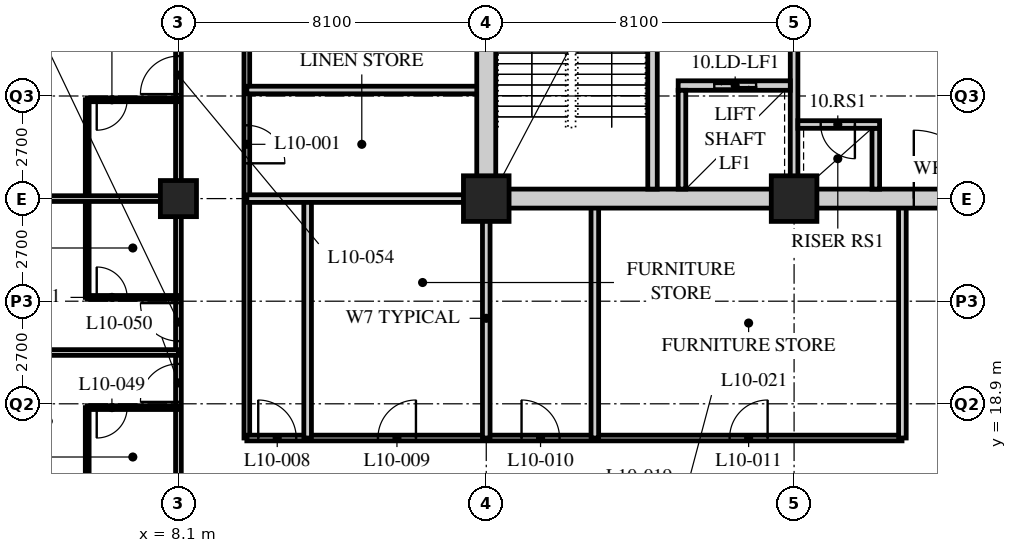
"""IFC4 building model, lengths in metres.
Left out: names, types, materials, properties, quantities, classifications, styles, units other than length and angle.
Written with IfcOpenShell. Run it as: python <this file> out.ifc"""

import sys

from ifc_helpers import new_model, si_unit, direction, frame, frame_2d, origin, origin_2d, place, context, subcontext, project, spatial, rectangle, hollow_rectangle, extrude, element, fill, save


model = new_model("IFC4")
c1 = context("Model", 3, precision=1e-05, world=origin(), true_north=direction((0.0, 1.0)))
c2 = subcontext(c1, "Body", "Model", "MODEL_VIEW")
j1 = project(units=[si_unit("LENGTHUNIT", "METRE"), si_unit("PLANEANGLEUNIT", "RADIAN")], contexts=[c1])
p1 = place(None, origin())
s1 = spatial("IfcSite", under=j1, at=p1, CompositionType="ELEMENT")
p2 = place(p1, origin())
s2 = spatial("IfcBuilding", under=s1, at=p2, CompositionType="ELEMENT")
p3 = place(p2, frame((0.0, 0.0, 46.6)))
s3 = spatial("IfcBuildingStorey", under=s2, at=p3, CompositionType="ELEMENT", Elevation=46.6)
p4 = place(p3, frame((8.1, 24.3, 0.0), z_axis=(0.0, 0.0, 1.0), x_axis=(1.0, 0.0, 0.0)))
e1 = element("IfcColumn", 1, at=p4, inside=s3, PredefinedType="COLUMN", context=c2, shape_type="SweptSolid", body=[
    extrude(hollow_rectangle(XDim=0.95, YDim=0.95, WallThickness=0.095, at=origin_2d()), origin(), (0.0, 0.0, 1.0), 3.4),
])
for number, where, z_axis, x_axis in (
    (2, (16.2, 24.3, 0.0), (0.0, 0.0, 1.0), (1.0, 0.0, 0.0)),
    (3, (24.3, 24.3, 0.0), (0.0, 0.0, 1.0), (1.0, 0.0, 0.0)),
):
    element("IfcColumn", number, at=place(p3, frame(where, z_axis=z_axis, x_axis=x_axis)), inside=s3, PredefinedType="COLUMN", context=c2, shape_type="SweptSolid", body=[
        extrude(hollow_rectangle(XDim=1.2, YDim=1.2, WallThickness=0.12, at=origin_2d()), origin(), (0.0, 0.0, 1.0), 3.4),
    ])
p5 = place(p3, frame((8.1, 16.2, 0.0), z_axis=(0.0, 0.0, 1.0), x_axis=(0.0, 1.0, 0.0)))
e4 = element("IfcWall", 4, at=p5, inside=s3, PredefinedType="PARTITIONING", context=c2, shape_type="SweptSolid", body=[
    extrude(rectangle(XDim=26.1, YDim=0.15, at=frame_2d((13.05, 0.0))), origin(), (0.0, 0.0, 1.0), 2.578),
])
p6 = place(p5, frame((2.75, 0.0, 0.0)))
e5 = element("IfcOpeningElement", 5, at=p6, cuts=e4, PredefinedType="OPENING", context=c2, shape_type="SweptSolid", body=[
    extrude(rectangle(XDim=1.0, YDim=2.1, at=frame_2d((0.5, 1.05))), frame((0.0, 0.085, 0.0), z_axis=(0.0, -1.0, 0.0), x_axis=(1.0, 0.0, 0.0)), (0.0, 0.0, 1.0), 0.17),
])
p7 = place(p5, frame((4.35, 0.0, 0.0)))
e6 = element("IfcOpeningElement", 6, at=p7, cuts=e4, PredefinedType="OPENING", context=c2, shape_type="SweptSolid", body=[
    extrude(rectangle(XDim=1.0, YDim=2.1, at=frame_2d((0.5, 1.05))), frame((0.0, 0.085, 0.0), z_axis=(0.0, -1.0, 0.0), x_axis=(1.0, 0.0, 0.0)), (0.0, 0.0, 1.0), 0.17),
])
p8 = place(p5, frame((10.85, 0.0, 0.0)))
e7 = element("IfcOpeningElement", 7, at=p8, cuts=e4, PredefinedType="OPENING", context=c2, shape_type="SweptSolid", body=[
    extrude(rectangle(XDim=1.0, YDim=2.1, at=frame_2d((0.5, 1.05))), frame((0.0, 0.085, 0.0), z_axis=(0.0, -1.0, 0.0), x_axis=(1.0, 0.0, 0.0)), (0.0, 0.0, 1.0), 0.17),
])
p9 = place(p5, frame((12.45, 0.0, 0.0)))
e8 = element("IfcOpeningElement", 8, at=p9, cuts=e4, PredefinedType="OPENING", context=c2, shape_type="SweptSolid", body=[
    extrude(rectangle(XDim=1.0, YDim=2.1, at=frame_2d((0.5, 1.05))), frame((0.0, 0.085, 0.0), z_axis=(0.0, -1.0, 0.0), x_axis=(1.0, 0.0, 0.0)), (0.0, 0.0, 1.0), 0.17),
])
p10 = place(p5, frame((18.65, 0.0, 0.0)))
e9 = element("IfcOpeningElement", 9, at=p10, cuts=e4, PredefinedType="OPENING", context=c2, shape_type="SweptSolid", body=[
    extrude(rectangle(XDim=1.0, YDim=2.1, at=frame_2d((0.5, 1.05))), frame((0.0, 0.085, 0.0), z_axis=(0.0, -1.0, 0.0), x_axis=(1.0, 0.0, 0.0)), (0.0, 0.0, 1.0), 0.17),
])
p11 = place(p5, frame((22.7, 0.0, 0.0)))
e10 = element("IfcOpeningElement", 10, at=p11, cuts=e4, PredefinedType="OPENING", context=c2, shape_type="SweptSolid", body=[
    extrude(rectangle(XDim=1.0, YDim=2.1, at=frame_2d((0.5, 1.05))), frame((0.0, 0.085, 0.0), z_axis=(0.0, -1.0, 0.0), x_axis=(1.0, 0.0, 0.0)), (0.0, 0.0, 1.0), 0.17),
])
p12 = place(p3, frame((9.9, 40.5, 0.0), z_axis=(0.0, 0.0, 1.0), x_axis=(0.0, -1.0, 0.0)))
e11 = element("IfcWall", 11, at=p12, inside=s3, PredefinedType="PARTITIONING", context=c2, shape_type="SweptSolid", body=[
    extrude(rectangle(XDim=22.5, YDim=0.15, at=frame_2d((11.25, 0.0))), origin(), (0.0, 0.0, 1.0), 3.19),
])
p13 = place(p12, frame((14.271, 0.0, 0.0)))
e12 = element("IfcOpeningElement", 12, at=p13, cuts=e11, PredefinedType="OPENING", context=c2, shape_type="SweptSolid", body=[
    extrude(rectangle(XDim=1.0, YDim=2.1, at=frame_2d((0.5, 1.05))), frame((0.0, 0.085, 0.0), z_axis=(0.0, -1.0, 0.0), x_axis=(1.0, 0.0, 0.0)), (0.0, 0.0, 1.0), 0.17),
])
p14 = place(p12, frame((10.221, 0.0, 0.0)))
e13 = element("IfcOpeningElement", 13, at=p14, cuts=e11, PredefinedType="OPENING", context=c2, shape_type="SweptSolid", body=[
    extrude(rectangle(XDim=1.0, YDim=2.1, at=frame_2d((0.5, 1.05))), frame((0.0, 0.085, 0.0), z_axis=(0.0, -1.0, 0.0), x_axis=(1.0, 0.0, 0.0)), (0.0, 0.0, 1.0), 0.17),
])
p15 = place(p12, frame((6.8, 0.0, 0.0)))
e14 = element("IfcOpeningElement", 14, at=p15, cuts=e11, PredefinedType="OPENING", context=c2, shape_type="SweptSolid", body=[
    extrude(rectangle(XDim=1.0, YDim=2.1, at=frame_2d((0.5, 1.05))), frame((0.0, 0.085, 0.0), z_axis=(0.0, -1.0, 0.0), x_axis=(1.0, 0.0, 0.0)), (0.0, 0.0, 1.0), 0.17),
])
p16 = place(p12, frame((2.75, 0.0, 0.0)))
e15 = element("IfcOpeningElement", 15, at=p16, cuts=e11, PredefinedType="OPENING", context=c2, shape_type="SweptSolid", body=[
    extrude(rectangle(XDim=1.0, YDim=2.1, at=frame_2d((0.5, 1.05))), frame((0.0, 0.085, 0.0), z_axis=(0.0, -1.0, 0.0), x_axis=(1.0, 0.0, 0.0)), (0.0, 0.0, 1.0), 0.17),
])
p17 = place(p3, frame((9.9, 18.0, 0.0), z_axis=(0.0, 0.0, 1.0), x_axis=(1.0, 0.0, 0.0)))
e16 = element("IfcWall", 16, at=p17, inside=s3, PredefinedType="PARTITIONING", context=c2, shape_type="SweptSolid", body=[
    extrude(rectangle(XDim=17.24, YDim=0.15, at=frame_2d((8.62, 0.0))), origin(), (0.0, 0.0, 1.0), 3.19),
])
p18 = place(p17, frame((0.3, 0.0, 0.0)))
e17 = element("IfcOpeningElement", 17, at=p18, cuts=e16, PredefinedType="OPENING", context=c2, shape_type="SweptSolid", body=[
    extrude(rectangle(XDim=1.0, YDim=2.1, at=frame_2d((0.5, 1.05))), frame((0.0, 0.085, 0.0), z_axis=(0.0, -1.0, 0.0), x_axis=(1.0, 0.0, 0.0)), (0.0, 0.0, 1.0), 0.17),
])
p19 = place(p17, frame((3.45, 0.0, 0.0)))
e18 = element("IfcOpeningElement", 18, at=p19, cuts=e16, PredefinedType="OPENING", context=c2, shape_type="SweptSolid", body=[
    extrude(rectangle(XDim=1.0, YDim=2.1, at=frame_2d((0.5, 1.05))), frame((0.0, 0.085, 0.0), z_axis=(0.0, -1.0, 0.0), x_axis=(1.0, 0.0, 0.0)), (0.0, 0.0, 1.0), 0.17),
])
p20 = place(p17, frame((7.229, 0.0, 0.0)))
e19 = element("IfcOpeningElement", 19, at=p20, cuts=e16, PredefinedType="OPENING", context=c2, shape_type="SweptSolid", body=[
    extrude(rectangle(XDim=1.0, YDim=2.1, at=frame_2d((0.5, 1.05))), frame((0.0, 0.085, 0.0), z_axis=(0.0, -1.0, 0.0), x_axis=(1.0, 0.0, 0.0)), (0.0, 0.0, 1.0), 0.17),
])
p21 = place(p17, frame((12.704, 0.0, 0.0)))
e20 = element("IfcOpeningElement", 20, at=p21, cuts=e16, PredefinedType="OPENING", context=c2, shape_type="SweptSolid", body=[
    extrude(rectangle(XDim=1.0, YDim=2.1, at=frame_2d((0.5, 1.05))), frame((0.0, 0.085, 0.0), z_axis=(0.0, -1.0, 0.0), x_axis=(1.0, 0.0, 0.0)), (0.0, 0.0, 1.0), 0.17),
])
p22 = place(p3, frame((9.9, 27.157, 0.0), z_axis=(0.0, 0.0, 1.0), x_axis=(1.0, 0.0, 0.0)))
e21 = element("IfcWall", 21, at=p22, inside=s3, PredefinedType="SOLIDWALL", context=c2, shape_type="SweptSolid", body=[
    extrude(rectangle(XDim=6.3, YDim=0.2, at=frame_2d((3.15, 0.0))), origin(), (0.0, 0.0, 1.0), 3.19),
])
p23 = place(p3, frame((16.2, 18.0, 0.0), z_axis=(0.0, 0.0, 1.0), x_axis=(0.0, 1.0, 0.0)))
e22 = element("IfcWall", 22, at=p23, inside=s3, PredefinedType="SOLIDWALL", context=c2, shape_type="SweptSolid", body=[
    extrude(rectangle(XDim=6.3, YDim=0.2, at=frame_2d((3.15, 0.0))), origin(), (0.0, 0.0, 1.0), 2.578),
])
for number, where, z_axis, x_axis in (
    (23, (11.5, 18.0, 0.0), (0.0, 0.0, 1.0), (0.0, 1.0, 0.0)),
    (24, (19.057, 18.0, 0.0), (0.0, 0.0, 1.0), (0.0, 1.0, 0.0)),
    (25, (27.15, 18.0, 0.0), (0.0, 0.0, 1.0), (0.0, 1.0, 0.0)),
):
    element("IfcWall", number, at=place(p3, frame(where, z_axis=z_axis, x_axis=x_axis)), inside=s3, PredefinedType="SOLIDWALL", context=c2, shape_type="SweptSolid", body=[
        extrude(rectangle(XDim=6.3, YDim=0.2, at=frame_2d((3.15, 0.0))), origin(), (0.0, 0.0, 1.0), 3.19),
    ])
p24 = place(p3, frame((9.9, 24.3, 0.0), z_axis=(0.0, 0.0, 1.0), x_axis=(1.0, 0.0, 0.0)))
e26 = element("IfcWall", 26, at=p24, inside=s3, PredefinedType="SOLIDWALL", context=c2, shape_type="SweptSolid", body=[
    extrude(rectangle(XDim=6.3, YDim=0.2, at=frame_2d((3.15, 0.0))), origin(), (0.0, 0.0, 1.0), 2.578),
])
p25 = place(p3, frame((5.7, 16.2, 0.0), z_axis=(0.0, 0.0, 1.0), x_axis=(0.0, 1.0, 0.0)))
e27 = element("IfcWall", 27, at=p25, inside=s3, PredefinedType="PARTITIONING", context=c2, shape_type="SweptSolid", body=[
    extrude(rectangle(XDim=2.6, YDim=0.1, at=frame_2d((1.3, 0.0))), origin(), (0.0, 0.0, 1.0), 3.19),
])
p26 = place(p3, frame((8.1, 18.8, 0.0), z_axis=(0.0, 0.0, 1.0), x_axis=(-1.0, 0.0, 0.0)))
e28 = element("IfcWall", 28, at=p26, inside=s3, PredefinedType="PARTITIONING", context=c2, shape_type="SweptSolid", body=[
    extrude(rectangle(XDim=2.4, YDim=0.1, at=frame_2d((1.2, 0.0))), origin(), (0.0, 0.0, 1.0), 3.19),
])
p27 = place(p26, frame((1.35, 0.0, 0.0)))
e29 = element("IfcOpeningElement", 29, at=p27, cuts=e28, PredefinedType="OPENING", context=c2, shape_type="SweptSolid", body=[
    extrude(rectangle(XDim=0.8, YDim=2.1, at=frame_2d((0.4, 1.05))), frame((0.0, 0.06, 0.0), z_axis=(0.0, -1.0, 0.0), x_axis=(1.0, 0.0, 0.0)), (0.0, 0.0, 1.0), 0.12),
])
p28 = place(p3, frame((8.1, 20.25, 0.0), z_axis=(0.0, 0.0, 1.0), x_axis=(-1.0, 0.0, 0.0)))
e30 = element("IfcWall", 30, at=p28, inside=s3, PredefinedType="PARTITIONING", context=c2, shape_type="SweptSolid", body=[
    extrude(rectangle(XDim=7.8, YDim=0.15, at=frame_2d((3.9, 0.0))), origin(), (0.0, 0.0, 1.0), 3.19),
])
p29 = place(p3, frame((5.7, 21.7, 0.0), z_axis=(0.0, 0.0, 1.0), x_axis=(0.0, 1.0, 0.0)))
e31 = element("IfcWall", 31, at=p29, inside=s3, PredefinedType="PARTITIONING", context=c2, shape_type="SweptSolid", body=[
    extrude(rectangle(XDim=5.2, YDim=0.1, at=frame_2d((2.6, 0.0))), origin(), (0.0, 0.0, 1.0), 3.19),
])
p30 = place(p3, frame((8.1, 21.7, 0.0), z_axis=(0.0, 0.0, 1.0), x_axis=(-1.0, 0.0, 0.0)))
e32 = element("IfcWall", 32, at=p30, inside=s3, PredefinedType="PARTITIONING", context=c2, shape_type="SweptSolid", body=[
    extrude(rectangle(XDim=2.4, YDim=0.1, at=frame_2d((1.2, 0.0))), origin(), (0.0, 0.0, 1.0), 3.19),
])
p31 = place(p30, frame((1.35, 0.0, 0.0)))
e33 = element("IfcOpeningElement", 33, at=p31, cuts=e32, PredefinedType="OPENING", context=c2, shape_type="SweptSolid", body=[
    extrude(rectangle(XDim=0.8, YDim=2.1, at=frame_2d((0.4, 1.05))), frame((0.0, 0.06, 0.0), z_axis=(0.0, -1.0, 0.0), x_axis=(1.0, 0.0, 0.0)), (0.0, 0.0, 1.0), 0.12),
])
p32 = place(p3, frame((8.1, 24.3, 0.0), z_axis=(0.0, 0.0, 1.0), x_axis=(-1.0, 0.0, 0.0)))
e34 = element("IfcWall", 34, at=p32, inside=s3, PredefinedType="PARTITIONING", context=c2, shape_type="SweptSolid", body=[
    extrude(rectangle(XDim=7.8, YDim=0.15, at=frame_2d((3.9, 0.0))), origin(), (0.0, 0.0, 1.0), 2.578),
])
p33 = place(p3, frame((8.1, 26.9, 0.0), z_axis=(0.0, 0.0, 1.0), x_axis=(-1.0, 0.0, 0.0)))
e35 = element("IfcWall", 35, at=p33, inside=s3, PredefinedType="PARTITIONING", context=c2, shape_type="SweptSolid", body=[
    extrude(rectangle(XDim=2.4, YDim=0.1, at=frame_2d((1.2, 0.0))), origin(), (0.0, 0.0, 1.0), 3.19),
])
p34 = place(p33, frame((1.35, 0.0, 0.0)))
e36 = element("IfcOpeningElement", 36, at=p34, cuts=e35, PredefinedType="OPENING", context=c2, shape_type="SweptSolid", body=[
    extrude(rectangle(XDim=0.8, YDim=2.1, at=frame_2d((0.4, 1.05))), frame((0.0, 0.06, 0.0), z_axis=(0.0, -1.0, 0.0), x_axis=(1.0, 0.0, 0.0)), (0.0, 0.0, 1.0), 0.12),
])
p35 = place(p3, frame((15.95, 24.3, 0.0), z_axis=(0.0, 0.0, 1.0), x_axis=(1.0, 0.0, 0.0)))
e37 = element("IfcWall", 37, at=p35, inside=s3, PredefinedType="SOLIDWALL", context=c2, shape_type="SweptSolid", body=[
    extrude(rectangle(XDim=24.8, YDim=0.5, at=frame_2d((12.4, 0.0))), origin(), (0.0, 0.0, 1.0), 2.54),
])
p36 = place(p35, frame((11.5, 0.0, 0.0)))
e38 = element("IfcOpeningElement", 38, at=p36, cuts=e37, PredefinedType="OPENING", context=c2, shape_type="SweptSolid", body=[
    extrude(rectangle(XDim=1.8, YDim=2.4, at=frame_2d((0.9, 1.2))), frame((0.0, 0.26, 0.0), z_axis=(0.0, -1.0, 0.0), x_axis=(1.0, 0.0, 0.0)), (0.0, 0.0, 1.0), 0.52),
])
p37 = place(p3, frame((16.2, 24.55, 0.0), z_axis=(0.0, 0.0, 1.0), x_axis=(0.0, 1.0, 0.0)))
e39 = element("IfcWall", 39, at=p37, inside=s3, PredefinedType="SOLIDWALL", context=c2, shape_type="SweptSolid", body=[
    extrude(rectangle(XDim=15.7, YDim=0.5, at=frame_2d((7.85, 0.0))), origin(), (0.0, 0.0, 1.0), 2.578),
])
p38 = place(p3, frame((24.3, 24.55, 0.0), z_axis=(0.0, 0.0, 1.0), x_axis=(0.0, 1.0, 0.0)))
e40 = element("IfcWall", 40, at=p38, inside=s3, PredefinedType="SOLIDWALL", context=c2, shape_type="SweptSolid", body=[
    extrude(rectangle(XDim=7.75, YDim=0.2, at=frame_2d((3.875, 0.0))), origin(), (0.0, 0.0, 1.0), 2.578),
])
p39 = place(p38, frame((4.6, 0.0, 0.0)))
e41 = element("IfcOpeningElement", 41, at=p39, cuts=e40, PredefinedType="OPENING", context=c2, shape_type="SweptSolid", body=[
    extrude(rectangle(XDim=1.2, YDim=2.1, at=frame_2d((0.6, 1.05))), frame((0.0, 0.11, 0.0), z_axis=(0.0, -1.0, 0.0), x_axis=(1.0, 0.0, 0.0)), (0.0, 0.0, 1.0), 0.22),
])
p40 = place(p3, frame((20.575, 24.55, 0.0), z_axis=(0.0, 0.0, 1.0), x_axis=(0.0, 1.0, 0.0)))
e42 = element("IfcWall", 42, at=p40, inside=s3, PredefinedType="SOLIDWALL", context=c2, shape_type="SweptSolid", body=[
    extrude(rectangle(XDim=7.75, YDim=0.25, at=frame_2d((3.875, 0.0))), origin(), (0.0, 0.0, 1.0), 3.19),
])
p41 = place(p40, frame((6.2, 0.0, 0.0)))
e43 = element("IfcOpeningElement", 43, at=p41, cuts=e42, PredefinedType="OPENING", context=c2, shape_type="SweptSolid", body=[
    extrude(rectangle(XDim=1.2, YDim=2.1, at=frame_2d((0.6, 1.05))), frame((0.0, 0.135, 0.0), z_axis=(0.0, -1.0, 0.0), x_axis=(1.0, 0.0, 0.0)), (0.0, 0.0, 1.0), 0.27),
])
p42 = place(p3, frame((21.25, 27.275, 0.0), z_axis=(0.0, 0.0, 1.0), x_axis=(1.0, 0.0, 0.0)))
e44 = element("IfcWall", 44, at=p42, inside=s3, PredefinedType="SOLIDWALL", context=c2, shape_type="SweptSolid", body=[
    extrude(rectangle(XDim=2.95, YDim=0.25, at=frame_2d((1.475, 0.0))), origin(), (0.0, 0.0, 1.0), 3.19),
])
p43 = place(p42, frame((0.95, 0.0, 0.0)))
e45 = element("IfcOpeningElement", 45, at=p43, cuts=e44, PredefinedType="OPENING", context=c2, shape_type="SweptSolid", body=[
    extrude(rectangle(XDim=1.1, YDim=2.4, at=frame_2d((0.55, 1.2))), frame((0.0, 0.135, 0.0), z_axis=(0.0, -1.0, 0.0), x_axis=(1.0, 0.0, 0.0)), (0.0, 0.0, 1.0), 0.27),
])
p44 = place(p3, frame((21.35, 24.55, 0.0), z_axis=(0.0, 0.0, 1.0), x_axis=(0.0, 1.0, 0.0)))
e46 = element("IfcWall", 46, at=p44, inside=s3, PredefinedType="SOLIDWALL", context=c2, shape_type="SweptSolid", body=[
    extrude(rectangle(XDim=2.6, YDim=0.2, at=frame_2d((1.3, 0.0))), origin(), (0.0, 0.0, 1.0), 3.19),
])
p45 = place(p3, frame((26.45, 24.55, 0.0), z_axis=(0.0, 0.0, 1.0), x_axis=(0.0, 1.0, 0.0)))
e47 = element("IfcWall", 47, at=p45, inside=s3, PredefinedType="SOLIDWALL", context=c2, shape_type="SweptSolid", body=[
    extrude(rectangle(XDim=1.6, YDim=0.2, at=frame_2d((0.8, 0.0))), origin(), (0.0, 0.0, 1.0), 3.19),
])
p46 = place(p3, frame((24.4, 26.25, 0.0), z_axis=(0.0, 0.0, 1.0), x_axis=(1.0, 0.0, 0.0)))
e48 = element("IfcWall", 48, at=p46, inside=s3, PredefinedType="SOLIDWALL", context=c2, shape_type="SweptSolid", body=[
    extrude(rectangle(XDim=2.15, YDim=0.2, at=frame_2d((1.075, 0.0))), origin(), (0.0, 0.0, 1.0), 3.19),
])
p47 = place(p46, frame((0.6, 0.0, 0.0)))
e49 = element("IfcOpeningElement", 49, at=p47, cuts=e48, PredefinedType="OPENING", context=c2, shape_type="SweptSolid", body=[
    extrude(rectangle(XDim=0.9, YDim=2.1, at=frame_2d((0.45, 1.05))), frame((0.0, 0.11, 0.0), z_axis=(0.0, -1.0, 0.0), x_axis=(1.0, 0.0, 0.0)), (0.0, 0.0, 1.0), 0.22),
])
p48 = place(p13, origin())
e50 = element("IfcDoor", 50, at=p48, inside=s3, OperationType="SINGLE_SWING_RIGHT", PredefinedType="DOOR", context=c2, shape_type="SweptSolid", body=[
    extrude(rectangle(XDim=1.0, YDim=2.1, at=frame_2d((0.5, 1.05))), frame((0.0, 0.025, 0.0), z_axis=(0.0, -1.0, 0.0), x_axis=(1.0, 0.0, 0.0)), (0.0, 0.0, 1.0), 0.05),
])
fill(e12, e50)
p49 = place(p18, origin())
e51 = element("IfcDoor", 51, at=p49, inside=s3, OperationType="SINGLE_SWING_LEFT", PredefinedType="DOOR", context=c2, shape_type="SweptSolid", body=[
    extrude(rectangle(XDim=1.0, YDim=2.1, at=frame_2d((0.5, 1.05))), frame((0.0, 0.025, 0.0), z_axis=(0.0, -1.0, 0.0), x_axis=(1.0, 0.0, 0.0)), (0.0, 0.0, 1.0), 0.05),
])
fill(e17, e51)
p50 = place(p19, origin())
e52 = element("IfcDoor", 52, at=p50, inside=s3, OperationType="SINGLE_SWING_RIGHT", PredefinedType="DOOR", context=c2, shape_type="SweptSolid", body=[
    extrude(rectangle(XDim=1.0, YDim=2.1, at=frame_2d((0.5, 1.05))), frame((0.0, 0.025, 0.0), z_axis=(0.0, -1.0, 0.0), x_axis=(1.0, 0.0, 0.0)), (0.0, 0.0, 1.0), 0.05),
])
fill(e18, e52)
p51 = place(p20, origin())
e53 = element("IfcDoor", 53, at=p51, inside=s3, OperationType="SINGLE_SWING_LEFT", PredefinedType="DOOR", context=c2, shape_type="SweptSolid", body=[
    extrude(rectangle(XDim=1.0, YDim=2.1, at=frame_2d((0.5, 1.05))), frame((0.0, 0.025, 0.0), z_axis=(0.0, -1.0, 0.0), x_axis=(1.0, 0.0, 0.0)), (0.0, 0.0, 1.0), 0.05),
])
fill(e19, e53)
p52 = place(p21, origin())
e54 = element("IfcDoor", 54, at=p52, inside=s3, OperationType="SINGLE_SWING_RIGHT", PredefinedType="DOOR", context=c2, shape_type="SweptSolid", body=[
    extrude(rectangle(XDim=1.0, YDim=2.1, at=frame_2d((0.5, 1.05))), frame((0.0, 0.025, 0.0), z_axis=(0.0, -1.0, 0.0), x_axis=(1.0, 0.0, 0.0)), (0.0, 0.0, 1.0), 0.05),
])
fill(e20, e54)
p53 = place(p27, origin())
e55 = element("IfcDoor", 55, at=p53, inside=s3, OperationType="SINGLE_SWING_RIGHT", PredefinedType="DOOR", context=c2, shape_type="SweptSolid", body=[
    extrude(rectangle(XDim=0.8, YDim=2.1, at=frame_2d((0.4, 1.05))), frame((0.0, 0.025, 0.0), z_axis=(0.0, -1.0, 0.0), x_axis=(1.0, 0.0, 0.0)), (0.0, 0.0, 1.0), 0.05),
])
fill(e29, e55)
p54 = place(p6, origin())
e56 = element("IfcDoor", 56, at=p54, inside=s3, OperationType="SINGLE_SWING_LEFT", PredefinedType="DOOR", context=c2, shape_type="SweptSolid", body=[
    extrude(rectangle(XDim=1.0, YDim=2.1, at=frame_2d((0.5, 1.05))), frame((0.0, 0.025, 0.0), z_axis=(0.0, -1.0, 0.0), x_axis=(1.0, 0.0, 0.0)), (0.0, 0.0, 1.0), 0.05),
])
fill(e5, e56)
p55 = place(p31, origin())
e57 = element("IfcDoor", 57, at=p55, inside=s3, OperationType="SINGLE_SWING_LEFT", PredefinedType="DOOR", context=c2, shape_type="SweptSolid", body=[
    extrude(rectangle(XDim=0.8, YDim=2.1, at=frame_2d((0.4, 1.05))), frame((0.0, 0.025, 0.0), z_axis=(0.0, -1.0, 0.0), x_axis=(1.0, 0.0, 0.0)), (0.0, 0.0, 1.0), 0.05),
])
fill(e33, e57)
p56 = place(p7, origin())
e58 = element("IfcDoor", 58, at=p56, inside=s3, OperationType="SINGLE_SWING_RIGHT", PredefinedType="DOOR", context=c2, shape_type="SweptSolid", body=[
    extrude(rectangle(XDim=1.0, YDim=2.1, at=frame_2d((0.5, 1.05))), frame((0.0, 0.025, 0.0), z_axis=(0.0, -1.0, 0.0), x_axis=(1.0, 0.0, 0.0)), (0.0, 0.0, 1.0), 0.05),
])
fill(e6, e58)
p57 = place(p34, origin())
e59 = element("IfcDoor", 59, at=p57, inside=s3, OperationType="SINGLE_SWING_RIGHT", PredefinedType="DOOR", context=c2, shape_type="SweptSolid", body=[
    extrude(rectangle(XDim=0.8, YDim=2.1, at=frame_2d((0.4, 1.05))), frame((0.0, 0.025, 0.0), z_axis=(0.0, -1.0, 0.0), x_axis=(1.0, 0.0, 0.0)), (0.0, 0.0, 1.0), 0.05),
])
fill(e36, e59)
p58 = place(p8, origin())
e60 = element("IfcDoor", 60, at=p58, inside=s3, OperationType="SINGLE_SWING_LEFT", PredefinedType="DOOR", context=c2, shape_type="SweptSolid", body=[
    extrude(rectangle(XDim=1.0, YDim=2.1, at=frame_2d((0.5, 1.05))), frame((0.0, 0.025, 0.0), z_axis=(0.0, -1.0, 0.0), x_axis=(1.0, 0.0, 0.0)), (0.0, 0.0, 1.0), 0.05),
])
fill(e7, e60)
p59 = place(p47, origin())
e61 = element("IfcDoor", 61, at=p59, inside=s3, OperationType="SINGLE_SWING_LEFT", PredefinedType="DOOR", context=c2, shape_type="SweptSolid", body=[
    extrude(rectangle(XDim=0.9, YDim=2.1, at=frame_2d((0.45, 1.05))), frame((0.0, 0.025, 0.0), z_axis=(0.0, -1.0, 0.0), x_axis=(1.0, 0.0, 0.0)), (0.0, 0.0, 1.0), 0.05),
])
fill(e49, e61)
p60 = place(p43, origin())
e62 = element("IfcDoor", 62, at=p60, inside=s3, OperationType="DOUBLE_DOOR_SLIDING", PredefinedType="DOOR", context=c2, shape_type="SweptSolid", body=[
    extrude(rectangle(XDim=1.1, YDim=2.4, at=frame_2d((0.55, 1.2))), frame((0.0, 0.025, 0.0), z_axis=(0.0, -1.0, 0.0), x_axis=(1.0, 0.0, 0.0)), (0.0, 0.0, 1.0), 0.05),
])
fill(e45, e62)
p61 = place(p36, origin())
e63 = element("IfcDoor", 63, at=p61, inside=s3, OperationType="DOUBLE_DOOR_SINGLE_SWING", PredefinedType="DOOR", context=c2, shape_type="SweptSolid", body=[
    extrude(rectangle(XDim=1.8, YDim=2.4, at=frame_2d((0.9, 1.2))), frame((0.0, 0.025, 0.0), z_axis=(0.0, -1.0, 0.0), x_axis=(1.0, 0.0, 0.0)), (0.0, 0.0, 1.0), 0.05),
])
fill(e38, e63)
save(model, sys.argv[1])
